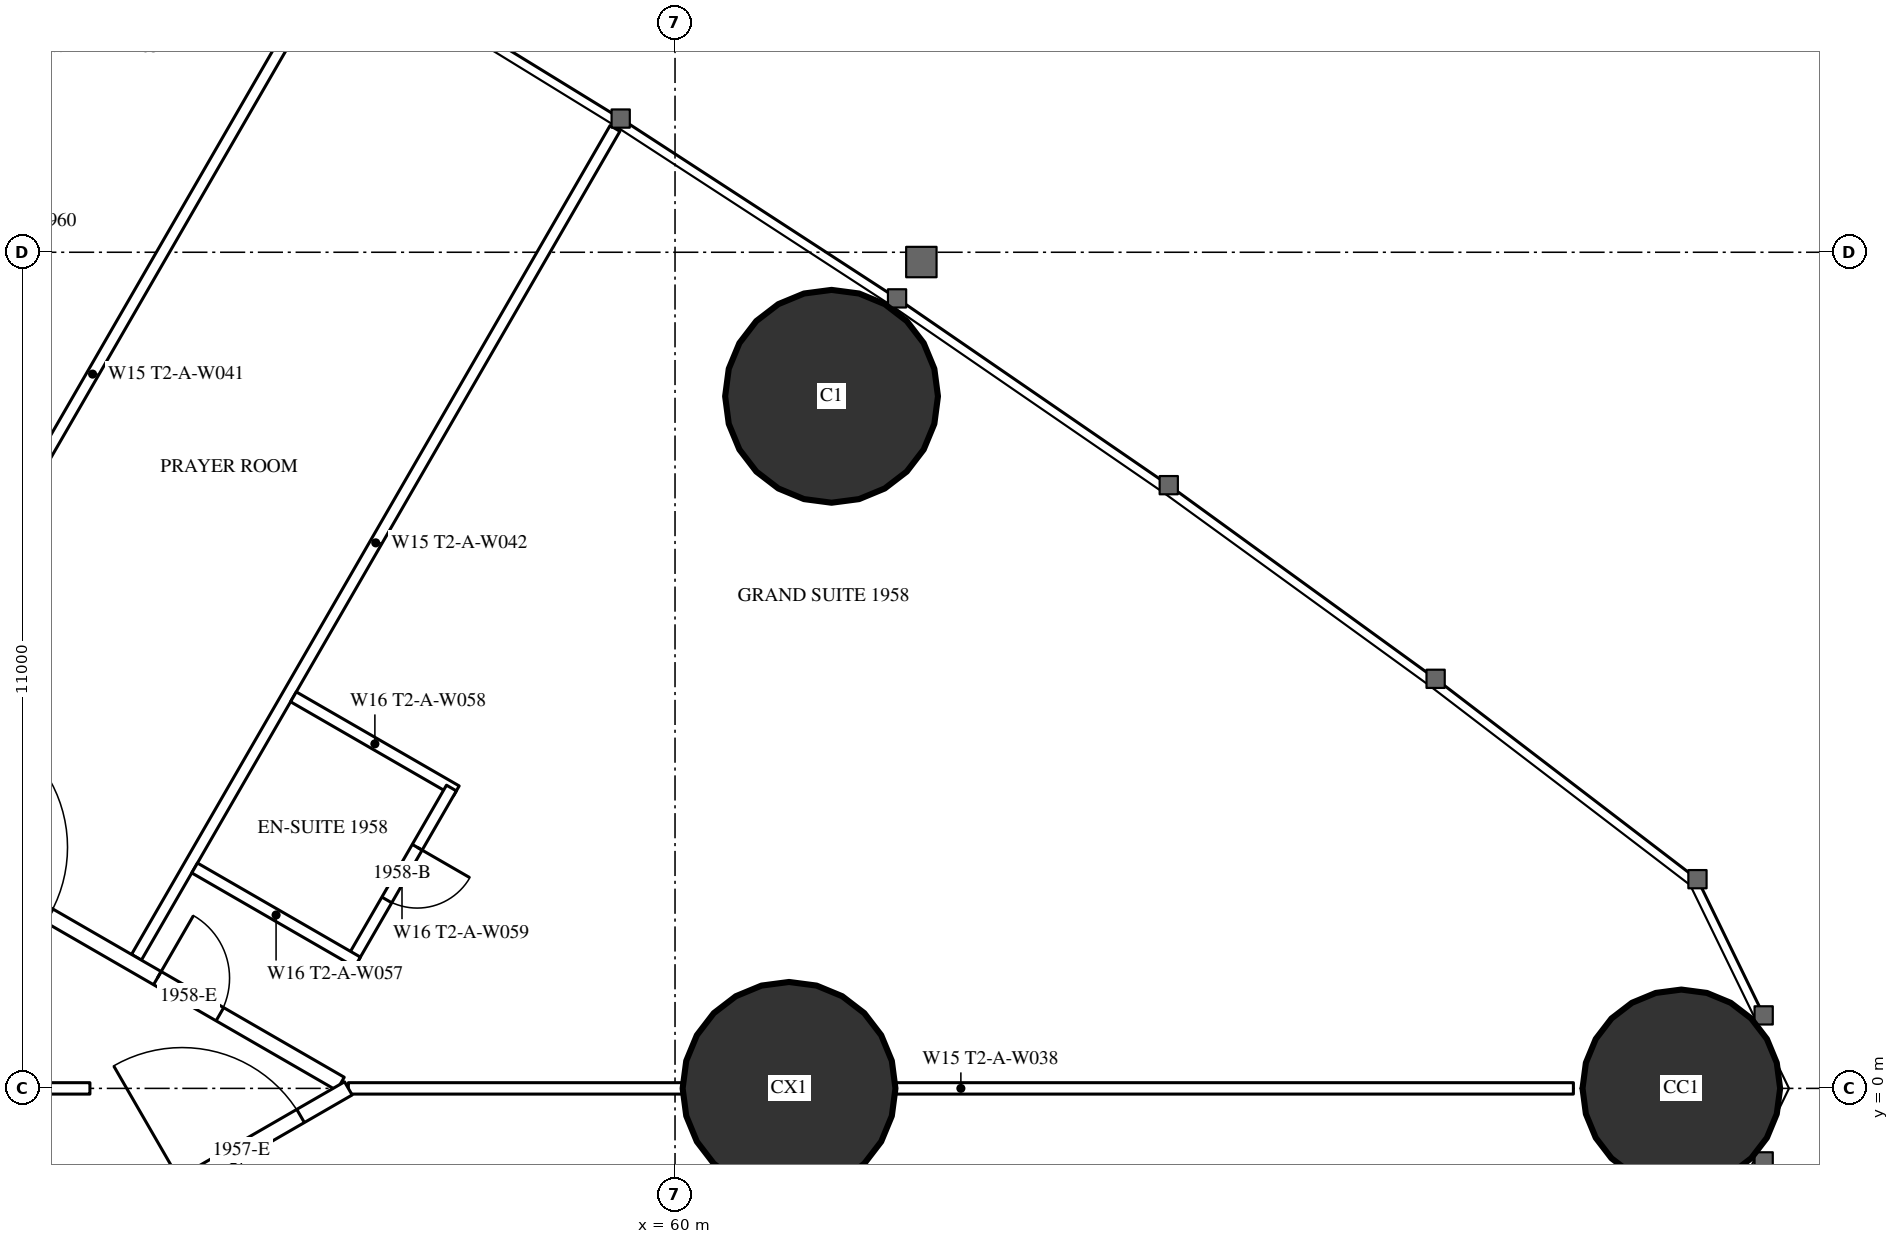
"""IFC4 building model, lengths in metres.
Left out: names, types, materials, properties, quantities, classifications, styles, units other than length and angle.
Written with IfcOpenShell. Run it as: python <this file> out.ifc"""

import sys

from ifc_helpers import new_model, si_unit, direction, frame, frame_2d, origin, origin_2d, place, context, subcontext, project, spatial, rectangle, hollow_circle, extrude, element, fill, save


model = new_model("IFC4")
c1 = context("Model", 3, precision=1e-05, world=origin(), true_north=direction((0.0, 1.0)))
c2 = subcontext(c1, "Body", "Model", "MODEL_VIEW")
j1 = project(units=[si_unit("LENGTHUNIT", "METRE"), si_unit("PLANEANGLEUNIT", "RADIAN")], contexts=[c1])
p1 = place(None, origin())
s1 = spatial("IfcSite", under=j1, at=p1, CompositionType="ELEMENT")
p2 = place(p1, origin())
s2 = spatial("IfcBuilding", under=s1, at=p2, CompositionType="ELEMENT")
p3 = place(p2, frame((0.0, 0.0, 74.0)))
s3 = spatial("IfcBuildingStorey", under=s2, at=p3, CompositionType="ELEMENT", Elevation=74.0)
p4 = place(p3, frame((73.239, 0.0, 0.0), z_axis=(0.0, 0.0, 1.0), x_axis=(1.0, 0.0, 0.0)))
e1 = element("IfcColumn", 1, at=p4, inside=s3, PredefinedType="COLUMN", context=c2, shape_type="SweptSolid", body=[
    extrude(hollow_circle(Radius=1.3, WallThickness=0.1, at=origin_2d()), origin(), (0.0, 0.0, 1.0), 3.5),
])
p5 = place(p3, frame((62.059, 9.105, 0.0), z_axis=(0.0, 0.0, 1.0), x_axis=(1.0, 0.0, 0.0)))
e2 = element("IfcColumn", 2, at=p5, inside=s3, PredefinedType="COLUMN", context=c2, shape_type="SweptSolid", body=[
    extrude(hollow_circle(Radius=1.4, WallThickness=0.12, at=origin_2d()), origin(), (0.0, 0.0, 1.0), 3.5),
])
p6 = place(p3, frame((61.5, 0.0, 0.0), z_axis=(0.0, 0.0, 1.0), x_axis=(1.0, 0.0, 0.0)))
e3 = element("IfcColumn", 3, at=p6, inside=s3, PredefinedType="COLUMN", context=c2, shape_type="SweptSolid", body=[
    extrude(hollow_circle(Radius=1.4, WallThickness=0.1, at=origin_2d()), origin(), (0.0, 0.0, 1.0), 3.5),
])
p7 = place(p3, frame((49.159, 3.893, 0.0), z_axis=(0.0, 0.0, 1.0), x_axis=(0.499995664361, 0.866027906952, 0.0)))
e4 = element("IfcWall", 4, at=p7, inside=s3, PredefinedType="PARTITIONING", context=c2, shape_type="SweptSolid", body=[
    extrude(rectangle(XDim=12.711, YDim=0.15, at=frame_2d((6.356, 0.0))), origin(), (0.0, 0.0, 1.0), 3.25),
])
p8 = place(p3, frame((52.915, 1.725, 0.0), z_axis=(0.0, 0.0, 1.0), x_axis=(0.499997163113, 0.866027041656, 0.0)))
e5 = element("IfcWall", 5, at=p8, inside=s3, PredefinedType="PARTITIONING", context=c2, shape_type="SweptSolid", body=[
    extrude(rectangle(XDim=12.591, YDim=0.15, at=frame_2d((6.295, 0.0))), origin(), (0.0, 0.0, 1.0), 3.25),
])
p9 = place(p3, frame((55.702, 0.0, 0.0), z_axis=(0.0, 0.0, 1.0), x_axis=(1.0, 0.0, 0.0)))
e6 = element("IfcWall", 6, at=p9, inside=s3, PredefinedType="PARTITIONING", context=c2, shape_type="SweptSolid", body=[
    extrude(rectangle(XDim=16.117, YDim=0.15, at=frame_2d((8.059, 0.0))), origin(), (0.0, 0.0, 1.0), 2.25),
])
p10 = place(p3, frame((36.834, 10.894, 0.0), z_axis=(0.0, 0.0, 1.0), x_axis=(0.866028157229, -0.499995230863, 0.0)))
e7 = element("IfcWall", 7, at=p10, inside=s3, PredefinedType="PARTITIONING", context=c2, shape_type="SweptSolid", body=[
    extrude(rectangle(XDim=21.667, YDim=0.2, at=frame_2d((10.833, 0.0))), origin(), (0.0, 0.0, 1.0), 3.25),
])
p11 = place(p10, frame((18.885, 0.0, 0.0)))
e8 = element("IfcOpeningElement", 8, at=p11, cuts=e7, PredefinedType="OPENING", context=c2, shape_type="SweptSolid", body=[
    extrude(rectangle(XDim=0.95, YDim=2.2, at=frame_2d((0.475, 1.1))), frame((0.0, 0.11, 0.0), z_axis=(0.0, -1.0, 0.0), x_axis=(1.0, 0.0, 0.0)), (0.0, 0.0, 1.0), 0.22),
])
p12 = place(p10, frame((15.443, 0.0, 0.0)))
e9 = element("IfcOpeningElement", 9, at=p12, cuts=e7, PredefinedType="OPENING", context=c2, shape_type="SweptSolid", body=[
    extrude(rectangle(XDim=1.8, YDim=2.2, at=frame_2d((0.9, 1.1))), frame((0.0, 0.11, 0.0), z_axis=(0.0, -1.0, 0.0), x_axis=(1.0, 0.0, 0.0)), (0.0, 0.0, 1.0), 0.22),
])
p13 = place(p10, frame((12.562, 0.0, 0.0)))
e10 = element("IfcOpeningElement", 10, at=p13, cuts=e7, PredefinedType="OPENING", context=c2, shape_type="SweptSolid", body=[
    extrude(rectangle(XDim=0.95, YDim=2.2, at=frame_2d((0.475, 1.1))), frame((0.0, 0.11, 0.0), z_axis=(0.0, -1.0, 0.0), x_axis=(1.0, 0.0, 0.0)), (0.0, 0.0, 1.0), 0.22),
])
p14 = place(p10, frame((4.292, 0.0, 0.0)))
e11 = element("IfcOpeningElement", 11, at=p14, cuts=e7, PredefinedType="OPENING", context=c2, shape_type="SweptSolid", body=[
    extrude(rectangle(XDim=1.0, YDim=2.2, at=frame_2d((0.5, 1.1))), frame((0.0, 0.11, 0.0), z_axis=(0.0, -1.0, 0.0), x_axis=(1.0, 0.0, 0.0)), (0.0, 0.0, 1.0), 0.22),
])
p15 = place(p3, frame((52.886, -1.626, 0.0), z_axis=(0.0, 0.0, 1.0), x_axis=(0.866030540913, 0.499991102127, 0.0)))
e12 = element("IfcWall", 12, at=p15, inside=s3, PredefinedType="PARTITIONING", context=c2, shape_type="SweptSolid", body=[
    extrude(rectangle(XDim=3.251, YDim=0.2, at=frame_2d((1.626, 0.0))), origin(), (0.0, 0.0, 1.0), 3.25),
])
p16 = place(p15, frame((0.726, 0.0, 0.0)))
e13 = element("IfcOpeningElement", 13, at=p16, cuts=e12, PredefinedType="OPENING", context=c2, shape_type="SweptSolid", body=[
    extrude(rectangle(XDim=1.8, YDim=2.2, at=frame_2d((0.9, 1.1))), frame((0.0, 0.11, 0.0), z_axis=(0.0, -1.0, 0.0), x_axis=(1.0, 0.0, 0.0)), (0.0, 0.0, 1.0), 0.22),
])
p17 = place(p3, frame((54.98, 5.151, 0.0), z_axis=(0.0, 0.0, 1.0), x_axis=(0.86604923931, -0.499958713387, 0.0)))
e14 = element("IfcWall", 14, at=p17, inside=s3, PredefinedType="PARTITIONING", context=c2, shape_type="SweptSolid", body=[
    extrude(rectangle(XDim=2.475, YDim=0.15, at=frame_2d((1.237, 0.0))), origin(), (0.0, 0.0, 1.0), 3.25),
])
p18 = place(p3, frame((55.758, 1.7, 0.0), z_axis=(0.0, 0.0, 1.0), x_axis=(0.500006934395, 0.866021400173, 0.0)))
e15 = element("IfcWall", 15, at=p18, inside=s3, PredefinedType="PARTITIONING", context=c2, shape_type="SweptSolid", body=[
    extrude(rectangle(XDim=2.6, YDim=0.15, at=frame_2d((1.3, 0.0))), origin(), (0.0, 0.0, 1.0), 3.25),
])
p19 = place(p18, frame((0.9, 0.0, 0.0)))
e16 = element("IfcOpeningElement", 16, at=p19, cuts=e15, PredefinedType="OPENING", context=c2, shape_type="SweptSolid", body=[
    extrude(rectangle(XDim=0.8, YDim=2.2, at=frame_2d((0.4, 1.1))), frame((0.0, 0.085, 0.0), z_axis=(0.0, -1.0, 0.0), x_axis=(1.0, 0.0, 0.0)), (0.0, 0.0, 1.0), 0.17),
])
p20 = place(p3, frame((53.68, 2.9, 0.0), z_axis=(0.0, 0.0, 1.0), x_axis=(0.866006523861, -0.500032699561, 0.0)))
e17 = element("IfcWall", 17, at=p20, inside=s3, PredefinedType="PARTITIONING", context=c2, shape_type="SweptSolid", body=[
    extrude(rectangle(XDim=2.475, YDim=0.15, at=frame_2d((1.237, 0.0))), origin(), (0.0, 0.0, 1.0), 3.25),
])
p21 = place(p3, frame((44.575, 0.0, 0.0), z_axis=(0.0, 0.0, 1.0), x_axis=(1.0, 0.0, 0.0)))
e18 = element("IfcWall", 18, at=p21, inside=s3, PredefinedType="PARTITIONING", context=c2, shape_type="SweptSolid", body=[
    extrude(rectangle(XDim=7.727, YDim=0.15, at=frame_2d((3.864, 0.0))), origin(), (0.0, 0.0, 1.0), 2.25),
])
p22 = place(p16, origin())
e19 = element("IfcDoor", 19, at=p22, inside=s3, OperationType="DOUBLE_DOOR_SINGLE_SWING", PredefinedType="DOOR", context=c2, shape_type="SweptSolid", body=[
    extrude(rectangle(XDim=1.8, YDim=2.2, at=frame_2d((0.9, 1.1))), frame((0.0, 0.025, 0.0), z_axis=(0.0, -1.0, 0.0), x_axis=(1.0, 0.0, 0.0)), (0.0, 0.0, 1.0), 0.05),
])
fill(e13, e19)
p23 = place(p19, origin())
e20 = element("IfcDoor", 20, at=p23, inside=s3, OperationType="SINGLE_SWING_RIGHT", PredefinedType="DOOR", context=c2, shape_type="SweptSolid", body=[
    extrude(rectangle(XDim=0.8, YDim=2.2, at=frame_2d((0.4, 1.1))), frame((0.0, 0.025, 0.0), z_axis=(0.0, -1.0, 0.0), x_axis=(1.0, 0.0, 0.0)), (0.0, 0.0, 1.0), 0.05),
])
fill(e16, e20)
p24 = place(p11, origin())
e21 = element("IfcDoor", 21, at=p24, inside=s3, OperationType="SINGLE_SWING_LEFT", PredefinedType="DOOR", context=c2, shape_type="SweptSolid", body=[
    extrude(rectangle(XDim=0.95, YDim=2.2, at=frame_2d((0.475, 1.1))), frame((0.0, 0.025, 0.0), z_axis=(0.0, -1.0, 0.0), x_axis=(1.0, 0.0, 0.0)), (0.0, 0.0, 1.0), 0.05),
])
fill(e8, e21)
save(model, sys.argv[1])
